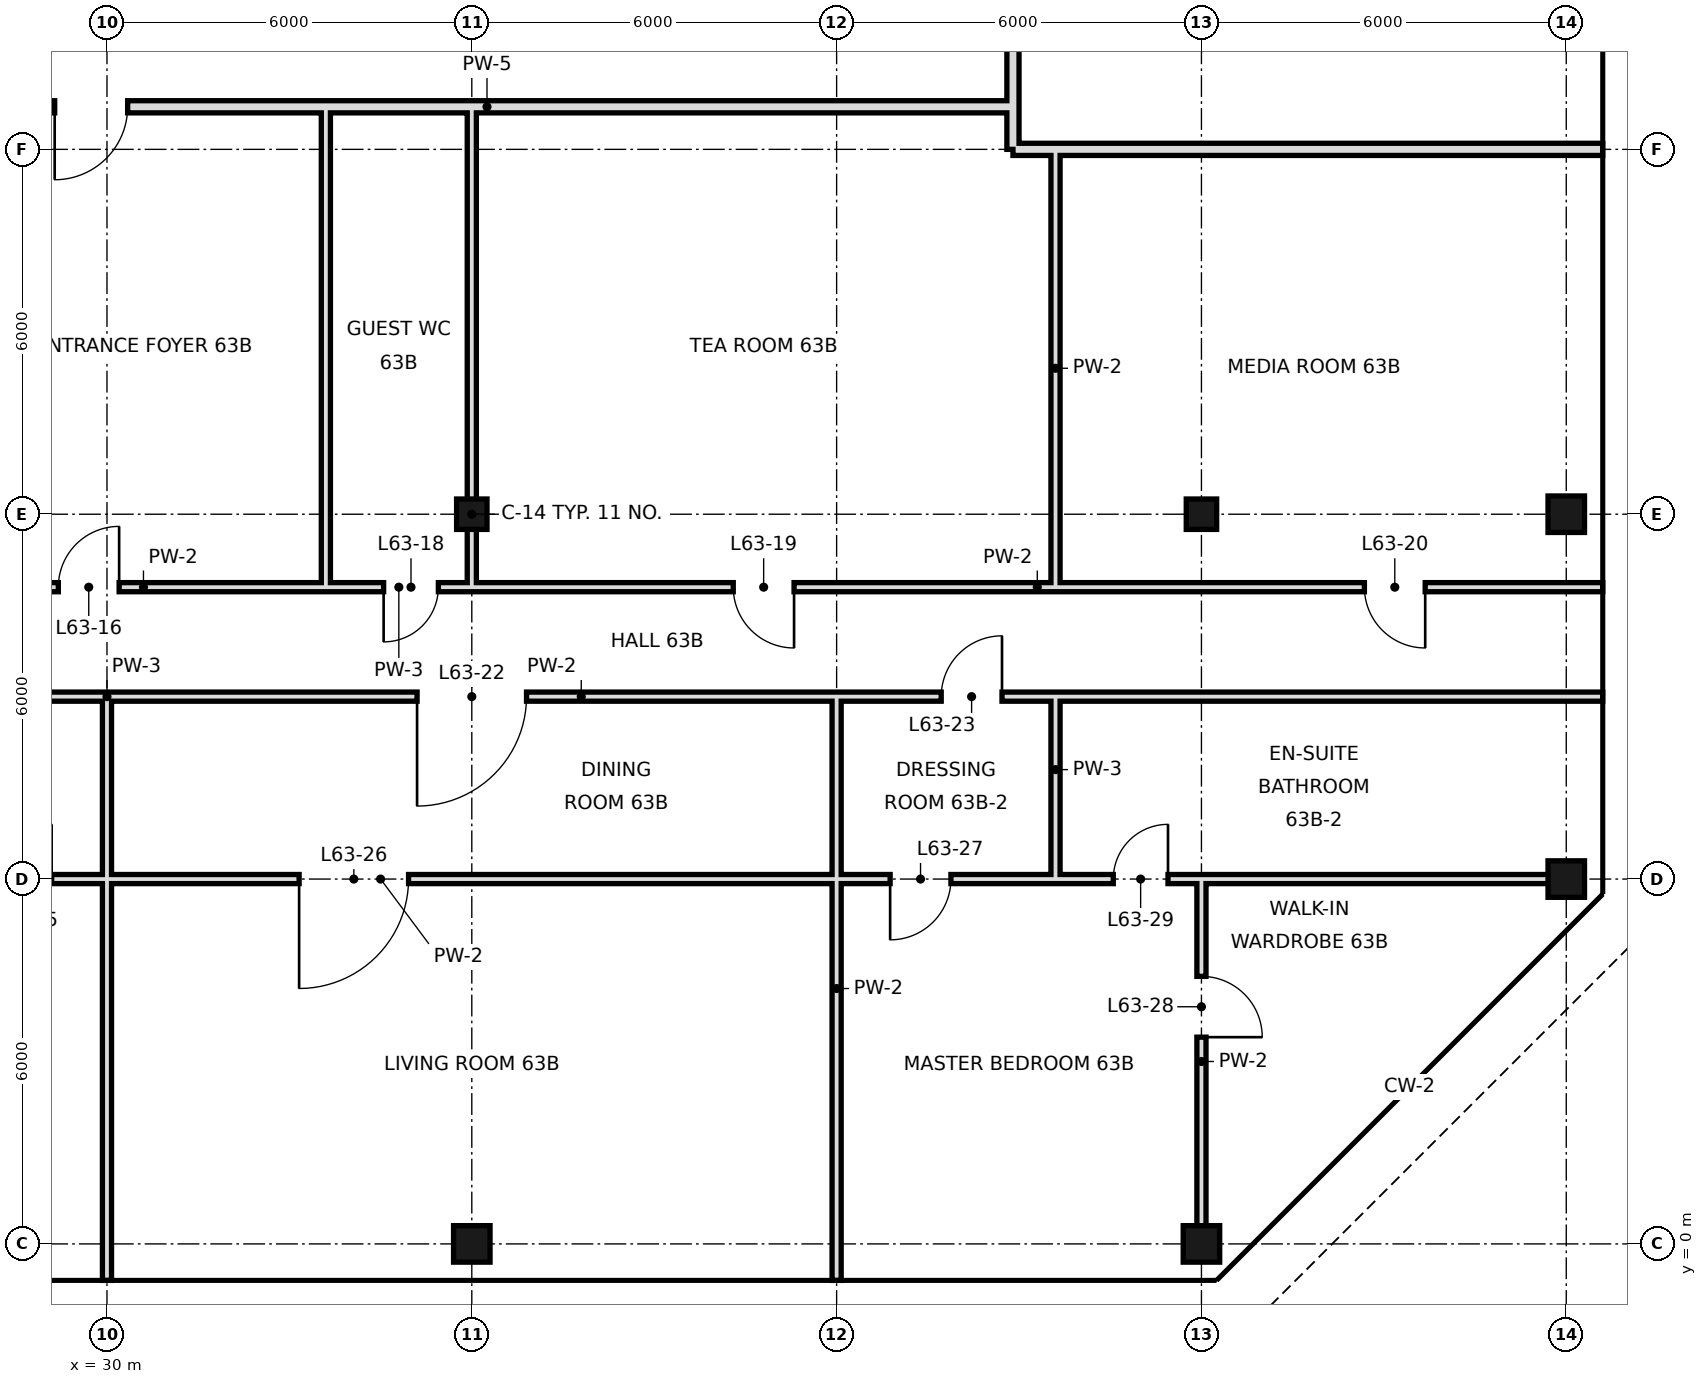
"""IFC4 building model, lengths in metres.
Left out: names, types, materials, properties, quantities, classifications, styles, units other than length and angle.
Written with IfcOpenShell. Run it as: python <this file> out.ifc"""

import sys

from ifc_helpers import new_model, si_unit, direction, frame, frame_2d, origin, origin_2d, place, context, subcontext, project, spatial, rectangle, hollow_rectangle, extrude, element, fill, save


model = new_model("IFC4")
c1 = context("Model", 3, precision=1e-05, world=origin(), true_north=direction((0.0, 1.0)))
c2 = subcontext(c1, "Body", "Model", "MODEL_VIEW")
j1 = project(units=[si_unit("LENGTHUNIT", "METRE"), si_unit("PLANEANGLEUNIT", "RADIAN")], contexts=[c1])
p1 = place(None, origin())
s1 = spatial("IfcSite", under=j1, at=p1, CompositionType="ELEMENT")
p2 = place(p1, origin())
s2 = spatial("IfcBuilding", under=s1, at=p2, CompositionType="ELEMENT")
p3 = place(p2, frame((0.0, 0.0, 266.6)))
s3 = spatial("IfcBuildingStorey", under=s2, at=p3, CompositionType="ELEMENT", Elevation=266.6)
p4 = place(p3, frame((36.0, 0.0, 0.0), z_axis=(0.0, 0.0, 1.0), x_axis=(1.0, 0.0, 0.0)))
e1 = element("IfcColumn", 1, at=p4, inside=s3, PredefinedType="COLUMN", context=c2, shape_type="SweptSolid", body=[
    extrude(hollow_rectangle(XDim=0.6, YDim=0.6, WallThickness=0.028, at=origin_2d()), origin(), (0.0, 0.0, 1.0), 3.6),
])
p5 = place(p3, frame((36.0, 12.0, 0.0), z_axis=(0.0, 0.0, 1.0), x_axis=(1.0, 0.0, 0.0)))
e2 = element("IfcColumn", 2, at=p5, inside=s3, PredefinedType="COLUMN", context=c2, shape_type="SweptSolid", body=[
    extrude(hollow_rectangle(XDim=0.5, YDim=0.5, WallThickness=0.025, at=origin_2d()), origin(), (0.0, 0.0, 1.0), 3.6),
])
p6 = place(p3, frame((48.0, 0.0, 0.0), z_axis=(0.0, 0.0, 1.0), x_axis=(1.0, 0.0, 0.0)))
e3 = element("IfcColumn", 3, at=p6, inside=s3, PredefinedType="COLUMN", context=c2, shape_type="SweptSolid", body=[
    extrude(hollow_rectangle(XDim=0.6, YDim=0.6, WallThickness=0.028, at=origin_2d()), origin(), (0.0, 0.0, 1.0), 3.6),
])
p7 = place(p3, frame((48.0, 12.0, 0.0), z_axis=(0.0, 0.0, 1.0), x_axis=(1.0, 0.0, 0.0)))
e4 = element("IfcColumn", 4, at=p7, inside=s3, PredefinedType="COLUMN", context=c2, shape_type="SweptSolid", body=[
    extrude(hollow_rectangle(XDim=0.5, YDim=0.5, WallThickness=0.025, at=origin_2d()), origin(), (0.0, 0.0, 1.0), 3.6),
])
for number, where, z_axis, x_axis in (
    (5, (54.0, 6.0, 0.0), (0.0, 0.0, 1.0), (1.0, 0.0, 0.0)),
    (6, (54.0, 12.0, 0.0), (0.0, 0.0, 1.0), (1.0, 0.0, 0.0)),
):
    element("IfcColumn", number, at=place(p3, frame(where, z_axis=z_axis, x_axis=x_axis)), inside=s3, PredefinedType="COLUMN", context=c2, shape_type="SweptSolid", body=[
        extrude(hollow_rectangle(XDim=0.6, YDim=0.6, WallThickness=0.028, at=origin_2d()), origin(), (0.0, 0.0, 1.0), 3.6),
    ])
p8 = place(p3, frame((30.0, -0.6, 0.0), z_axis=(0.0, 0.0, 1.0), x_axis=(0.0, 1.0, 0.0)))
e7 = element("IfcWall", 7, at=p8, inside=s3, PredefinedType="PARTITIONING", context=c2, shape_type="SweptSolid", body=[
    extrude(rectangle(XDim=6.6, YDim=0.15, at=frame_2d((3.3, 0.0))), origin(), (0.0, 0.0, 1.0), 2.72),
])
p9 = place(p3, frame((30.0, 6.0, 0.0), z_axis=(0.0, 0.0, 1.0), x_axis=(0.0, 1.0, 0.0)))
e8 = element("IfcWall", 8, at=p9, inside=s3, PredefinedType="PARTITIONING", context=c2, shape_type="SweptSolid", body=[
    extrude(rectangle(XDim=3.0, YDim=0.15, at=frame_2d((1.5, 0.0))), origin(), (0.0, 0.0, 1.0), 2.72),
])
p10 = place(p3, frame((33.6, 10.8, 0.0), z_axis=(0.0, 0.0, 1.0), x_axis=(0.0, 1.0, 0.0)))
e9 = element("IfcWall", 9, at=p10, inside=s3, PredefinedType="PARTITIONING", context=c2, shape_type="SweptSolid", body=[
    extrude(rectangle(XDim=7.9, YDim=0.15, at=frame_2d((3.95, 0.0))), origin(), (0.0, 0.0, 1.0), 3.42),
])
p11 = place(p3, frame((36.0, 10.8, 0.0), z_axis=(0.0, 0.0, 1.0), x_axis=(0.0, 1.0, 0.0)))
e10 = element("IfcWall", 10, at=p11, inside=s3, PredefinedType="PARTITIONING", context=c2, shape_type="SweptSolid", body=[
    extrude(rectangle(XDim=7.9, YDim=0.15, at=frame_2d((3.95, 0.0))), origin(), (0.0, 0.0, 1.0), 2.72),
])
p12 = place(p3, frame((42.0, -0.6, 0.0), z_axis=(0.0, 0.0, 1.0), x_axis=(0.0, 1.0, 0.0)))
e11 = element("IfcWall", 11, at=p12, inside=s3, PredefinedType="PARTITIONING", context=c2, shape_type="SweptSolid", body=[
    extrude(rectangle(XDim=9.6, YDim=0.15, at=frame_2d((4.8, 0.0))), origin(), (0.0, 0.0, 1.0), 2.72),
])
p13 = place(p3, frame((44.9, 18.0, 0.0), z_axis=(0.0, 0.0, 1.0), x_axis=(0.0, 1.0, 0.0)))
e12 = element("IfcWall", 12, at=p13, inside=s3, PredefinedType="SOLIDWALL", context=c2, shape_type="SweptSolid", body=[
    extrude(rectangle(XDim=30.6, YDim=0.2, at=frame_2d((15.3, 0.0))), origin(), (0.0, 0.0, 1.0), 2.72),
])
p14 = place(p13, frame((20.27, 0.0, 0.0)))
e13 = element("IfcOpeningElement", 13, at=p14, cuts=e12, PredefinedType="OPENING", context=c2, shape_type="SweptSolid", body=[
    extrude(rectangle(XDim=1.2, YDim=2.4, at=frame_2d((0.6, 1.2))), frame((0.0, 0.11, 0.0), z_axis=(0.0, -1.0, 0.0), x_axis=(1.0, 0.0, 0.0)), (0.0, 0.0, 1.0), 0.22),
])
p15 = place(p3, frame((45.6, 10.8, 0.0), z_axis=(0.0, 0.0, 1.0), x_axis=(0.0, 1.0, 0.0)))
e14 = element("IfcWall", 14, at=p15, inside=s3, PredefinedType="PARTITIONING", context=c2, shape_type="SweptSolid", body=[
    extrude(rectangle(XDim=7.2, YDim=0.15, at=frame_2d((3.6, 0.0))), origin(), (0.0, 0.0, 1.0), 3.42),
])
p16 = place(p3, frame((45.6, 6.0, 0.0), z_axis=(0.0, 0.0, 1.0), x_axis=(0.0, 1.0, 0.0)))
e15 = element("IfcWall", 15, at=p16, inside=s3, PredefinedType="PARTITIONING", context=c2, shape_type="SweptSolid", body=[
    extrude(rectangle(XDim=3.0, YDim=0.15, at=frame_2d((1.5, 0.0))), origin(), (0.0, 0.0, 1.0), 3.42),
])
p17 = place(p3, frame((48.0, 0.0, 0.0), z_axis=(0.0, 0.0, 1.0), x_axis=(0.0, 1.0, 0.0)))
e16 = element("IfcWall", 16, at=p17, inside=s3, PredefinedType="PARTITIONING", context=c2, shape_type="SweptSolid", body=[
    extrude(rectangle(XDim=6.0, YDim=0.15, at=frame_2d((3.0, 0.0))), origin(), (0.0, 0.0, 1.0), 2.72),
])
p18 = place(p17, frame((3.4, 0.0, 0.0)))
e17 = element("IfcOpeningElement", 17, at=p18, cuts=e16, PredefinedType="OPENING", context=c2, shape_type="SweptSolid", body=[
    extrude(rectangle(XDim=1.0, YDim=2.4, at=frame_2d((0.5, 1.2))), frame((0.0, 0.085, 0.0), z_axis=(0.0, -1.0, 0.0), x_axis=(1.0, 0.0, 0.0)), (0.0, 0.0, 1.0), 0.17),
])
p19 = place(p3, frame((27.6, 10.8, 0.0), z_axis=(0.0, 0.0, 1.0), x_axis=(1.0, 0.0, 0.0)))
e18 = element("IfcWall", 18, at=p19, inside=s3, PredefinedType="PARTITIONING", context=c2, shape_type="SweptSolid", body=[
    extrude(rectangle(XDim=6.0, YDim=0.15, at=frame_2d((3.0, 0.0))), origin(), (0.0, 0.0, 1.0), 3.42),
])
p20 = place(p19, frame((1.6, 0.0, 0.0)))
e19 = element("IfcOpeningElement", 19, at=p20, cuts=e18, PredefinedType="OPENING", context=c2, shape_type="SweptSolid", body=[
    extrude(rectangle(XDim=1.0, YDim=2.4, at=frame_2d((0.5, 1.2))), frame((0.0, 0.085, 0.0), z_axis=(0.0, -1.0, 0.0), x_axis=(1.0, 0.0, 0.0)), (0.0, 0.0, 1.0), 0.17),
])
p21 = place(p3, frame((36.0, 10.8, 0.0), z_axis=(0.0, 0.0, 1.0), x_axis=(1.0, 0.0, 0.0)))
e20 = element("IfcWall", 20, at=p21, inside=s3, PredefinedType="PARTITIONING", context=c2, shape_type="SweptSolid", body=[
    extrude(rectangle(XDim=18.6, YDim=0.15, at=frame_2d((9.3, 0.0))), origin(), (0.0, 0.0, 1.0), 3.42),
])
p22 = place(p21, frame((4.3, 0.0, 0.0)))
e21 = element("IfcOpeningElement", 21, at=p22, cuts=e20, PredefinedType="OPENING", context=c2, shape_type="SweptSolid", body=[
    extrude(rectangle(XDim=1.0, YDim=2.4, at=frame_2d((0.5, 1.2))), frame((0.0, 0.085, 0.0), z_axis=(0.0, -1.0, 0.0), x_axis=(1.0, 0.0, 0.0)), (0.0, 0.0, 1.0), 0.17),
])
p23 = place(p21, frame((14.68, 0.0, 0.0)))
e22 = element("IfcOpeningElement", 22, at=p23, cuts=e20, PredefinedType="OPENING", context=c2, shape_type="SweptSolid", body=[
    extrude(rectangle(XDim=1.0, YDim=2.4, at=frame_2d((0.5, 1.2))), frame((0.0, 0.085, 0.0), z_axis=(0.0, -1.0, 0.0), x_axis=(1.0, 0.0, 0.0)), (0.0, 0.0, 1.0), 0.17),
])
p24 = place(p3, frame((33.6, 10.8, 0.0), z_axis=(0.0, 0.0, 1.0), x_axis=(1.0, 0.0, 0.0)))
e23 = element("IfcWall", 23, at=p24, inside=s3, PredefinedType="PARTITIONING", context=c2, shape_type="SweptSolid", body=[
    extrude(rectangle(XDim=2.4, YDim=0.15, at=frame_2d((1.2, 0.0))), origin(), (0.0, 0.0, 1.0), 3.42),
])
p25 = place(p24, frame((0.95, 0.0, 0.0)))
e24 = element("IfcOpeningElement", 24, at=p25, cuts=e23, PredefinedType="OPENING", context=c2, shape_type="SweptSolid", body=[
    extrude(rectangle(XDim=0.9, YDim=2.4, at=frame_2d((0.45, 1.2))), frame((0.0, 0.085, 0.0), z_axis=(0.0, -1.0, 0.0), x_axis=(1.0, 0.0, 0.0)), (0.0, 0.0, 1.0), 0.17),
])
p26 = place(p3, frame((44.9, 18.0, 0.0), z_axis=(0.0, 0.0, 1.0), x_axis=(1.0, 0.0, 0.0)))
e25 = element("IfcWall", 25, at=p26, inside=s3, PredefinedType="SOLIDWALL", context=c2, shape_type="SweptSolid", body=[
    extrude(rectangle(XDim=9.7, YDim=0.2, at=frame_2d((4.85, 0.0))), origin(), (0.0, 0.0, 1.0), 2.72),
])
p27 = place(p3, frame((27.6, 18.7, 0.0), z_axis=(0.0, 0.0, 1.0), x_axis=(1.0, 0.0, 0.0)))
e26 = element("IfcWall", 26, at=p27, inside=s3, PredefinedType="SOLIDWALL", context=c2, shape_type="SweptSolid", body=[
    extrude(rectangle(XDim=17.3, YDim=0.2, at=frame_2d((8.65, 0.0))), origin(), (0.0, 0.0, 1.0), 2.72),
])
p28 = place(p27, frame((1.54, 0.0, 0.0)))
e27 = element("IfcOpeningElement", 27, at=p28, cuts=e26, PredefinedType="OPENING", context=c2, shape_type="SweptSolid", body=[
    extrude(rectangle(XDim=1.2, YDim=2.4, at=frame_2d((0.6, 1.2))), frame((0.0, 0.11, 0.0), z_axis=(0.0, -1.0, 0.0), x_axis=(1.0, 0.0, 0.0)), (0.0, 0.0, 1.0), 0.22),
])
p29 = place(p3, frame((30.0, 6.0, 0.0), z_axis=(0.0, 0.0, 1.0), x_axis=(1.0, 0.0, 0.0)))
e28 = element("IfcWall", 28, at=p29, inside=s3, PredefinedType="PARTITIONING", context=c2, shape_type="SweptSolid", body=[
    extrude(rectangle(XDim=15.6, YDim=0.15, at=frame_2d((7.8, 0.0))), origin(), (0.0, 0.0, 1.0), 2.97),
])
p30 = place(p29, frame((3.16, 0.0, 0.0)))
e29 = element("IfcOpeningElement", 29, at=p30, cuts=e28, PredefinedType="OPENING", context=c2, shape_type="SweptSolid", body=[
    extrude(rectangle(XDim=1.8, YDim=2.4, at=frame_2d((0.9, 1.2))), frame((0.0, 0.085, 0.0), z_axis=(0.0, -1.0, 0.0), x_axis=(1.0, 0.0, 0.0)), (0.0, 0.0, 1.0), 0.17),
])
p31 = place(p29, frame((12.88, 0.0, 0.0)))
e30 = element("IfcOpeningElement", 30, at=p31, cuts=e28, PredefinedType="OPENING", context=c2, shape_type="SweptSolid", body=[
    extrude(rectangle(XDim=1.0, YDim=2.4, at=frame_2d((0.5, 1.2))), frame((0.0, 0.085, 0.0), z_axis=(0.0, -1.0, 0.0), x_axis=(1.0, 0.0, 0.0)), (0.0, 0.0, 1.0), 0.17),
])
p32 = place(p3, frame((26.4, 6.0, 0.0), z_axis=(0.0, 0.0, 1.0), x_axis=(1.0, 0.0, 0.0)))
e31 = element("IfcWall", 31, at=p32, inside=s3, PredefinedType="PARTITIONING", context=c2, shape_type="SweptSolid", body=[
    extrude(rectangle(XDim=3.6, YDim=0.15, at=frame_2d((1.8, 0.0))), origin(), (0.0, 0.0, 1.0), 2.97),
])
p33 = place(p32, frame((1.79, 0.0, 0.0)))
e32 = element("IfcOpeningElement", 32, at=p33, cuts=e31, PredefinedType="OPENING", context=c2, shape_type="SweptSolid", body=[
    extrude(rectangle(XDim=0.9, YDim=2.4, at=frame_2d((0.45, 1.2))), frame((0.0, 0.085, 0.0), z_axis=(0.0, -1.0, 0.0), x_axis=(1.0, 0.0, 0.0)), (0.0, 0.0, 1.0), 0.17),
])
p34 = place(p3, frame((45.6, 6.0, 0.0), z_axis=(0.0, 0.0, 1.0), x_axis=(1.0, 0.0, 0.0)))
e33 = element("IfcWall", 33, at=p34, inside=s3, PredefinedType="PARTITIONING", context=c2, shape_type="SweptSolid", body=[
    extrude(rectangle(XDim=8.4, YDim=0.15, at=frame_2d((4.2, 0.0))), origin(), (0.0, 0.0, 1.0), 2.97),
])
p35 = place(p34, frame((0.95, 0.0, 0.0)))
e34 = element("IfcOpeningElement", 34, at=p35, cuts=e33, PredefinedType="OPENING", context=c2, shape_type="SweptSolid", body=[
    extrude(rectangle(XDim=0.9, YDim=2.4, at=frame_2d((0.45, 1.2))), frame((0.0, 0.085, 0.0), z_axis=(0.0, -1.0, 0.0), x_axis=(1.0, 0.0, 0.0)), (0.0, 0.0, 1.0), 0.17),
])
p36 = place(p3, frame((30.0, 9.0, 0.0), z_axis=(0.0, 0.0, 1.0), x_axis=(1.0, 0.0, 0.0)))
e35 = element("IfcWall", 35, at=p36, inside=s3, PredefinedType="PARTITIONING", context=c2, shape_type="SweptSolid", body=[
    extrude(rectangle(XDim=15.6, YDim=0.15, at=frame_2d((7.8, 0.0))), origin(), (0.0, 0.0, 1.0), 3.42),
])
p37 = place(p36, frame((5.1, 0.0, 0.0)))
e36 = element("IfcOpeningElement", 36, at=p37, cuts=e35, PredefinedType="OPENING", context=c2, shape_type="SweptSolid", body=[
    extrude(rectangle(XDim=1.8, YDim=2.4, at=frame_2d((0.9, 1.2))), frame((0.0, 0.085, 0.0), z_axis=(0.0, -1.0, 0.0), x_axis=(1.0, 0.0, 0.0)), (0.0, 0.0, 1.0), 0.17),
])
p38 = place(p36, frame((13.72, 0.0, 0.0)))
e37 = element("IfcOpeningElement", 37, at=p38, cuts=e35, PredefinedType="OPENING", context=c2, shape_type="SweptSolid", body=[
    extrude(rectangle(XDim=1.0, YDim=2.4, at=frame_2d((0.5, 1.2))), frame((0.0, 0.085, 0.0), z_axis=(0.0, -1.0, 0.0), x_axis=(1.0, 0.0, 0.0)), (0.0, 0.0, 1.0), 0.17),
])
p39 = place(p3, frame((26.4, 9.0, 0.0), z_axis=(0.0, 0.0, 1.0), x_axis=(1.0, 0.0, 0.0)))
e38 = element("IfcWall", 38, at=p39, inside=s3, PredefinedType="PARTITIONING", context=c2, shape_type="SweptSolid", body=[
    extrude(rectangle(XDim=3.6, YDim=0.15, at=frame_2d((1.8, 0.0))), origin(), (0.0, 0.0, 1.0), 3.42),
])
p40 = place(p3, frame((45.6, 9.0, 0.0), z_axis=(0.0, 0.0, 1.0), x_axis=(1.0, 0.0, 0.0)))
e39 = element("IfcWall", 39, at=p40, inside=s3, PredefinedType="PARTITIONING", context=c2, shape_type="SweptSolid", body=[
    extrude(rectangle(XDim=9.0, YDim=0.15, at=frame_2d((4.5, 0.0))), origin(), (0.0, 0.0, 1.0), 3.42),
])
p41 = place(p20, frame((1.0, 0.0, 0.0), z_axis=(0.0, 0.0, 1.0), x_axis=(-1.0, 0.0, 0.0)))
e40 = element("IfcDoor", 40, at=p41, inside=s3, OperationType="SINGLE_SWING_LEFT", PredefinedType="DOOR", context=c2, shape_type="SweptSolid", body=[
    extrude(rectangle(XDim=1.0, YDim=2.4, at=frame_2d((0.5, 1.2))), frame((0.0, 0.025, 0.0), z_axis=(0.0, -1.0, 0.0), x_axis=(1.0, 0.0, 0.0)), (0.0, 0.0, 1.0), 0.05),
])
fill(e19, e40)
p42 = place(p25, frame((0.9, 0.0, 0.0), z_axis=(0.0, 0.0, 1.0), x_axis=(-1.0, 0.0, 0.0)))
e41 = element("IfcDoor", 41, at=p42, inside=s3, OperationType="SINGLE_SWING_RIGHT", PredefinedType="DOOR", context=c2, shape_type="SweptSolid", body=[
    extrude(rectangle(XDim=0.9, YDim=2.4, at=frame_2d((0.45, 1.2))), frame((0.0, 0.025, 0.0), z_axis=(0.0, -1.0, 0.0), x_axis=(1.0, 0.0, 0.0)), (0.0, 0.0, 1.0), 0.05),
])
fill(e24, e41)
p43 = place(p22, origin())
e42 = element("IfcDoor", 42, at=p43, inside=s3, OperationType="SINGLE_SWING_RIGHT", PredefinedType="DOOR", context=c2, shape_type="SweptSolid", body=[
    extrude(rectangle(XDim=1.0, YDim=2.4, at=frame_2d((0.5, 1.2))), frame((0.0, 0.025, 0.0), z_axis=(0.0, -1.0, 0.0), x_axis=(1.0, 0.0, 0.0)), (0.0, 0.0, 1.0), 0.05),
])
fill(e21, e42)
p44 = place(p23, origin())
e43 = element("IfcDoor", 43, at=p44, inside=s3, OperationType="SINGLE_SWING_RIGHT", PredefinedType="DOOR", context=c2, shape_type="SweptSolid", body=[
    extrude(rectangle(XDim=1.0, YDim=2.4, at=frame_2d((0.5, 1.2))), frame((0.0, 0.025, 0.0), z_axis=(0.0, -1.0, 0.0), x_axis=(1.0, 0.0, 0.0)), (0.0, 0.0, 1.0), 0.05),
])
fill(e22, e43)
p45 = place(p37, frame((1.8, 0.0, 0.0), z_axis=(0.0, 0.0, 1.0), x_axis=(-1.0, 0.0, 0.0)))
e44 = element("IfcDoor", 44, at=p45, inside=s3, OperationType="SINGLE_SWING_RIGHT", PredefinedType="DOOR", context=c2, shape_type="SweptSolid", body=[
    extrude(rectangle(XDim=1.8, YDim=2.4, at=frame_2d((0.9, 1.2))), frame((0.0, 0.025, 0.0), z_axis=(0.0, -1.0, 0.0), x_axis=(1.0, 0.0, 0.0)), (0.0, 0.0, 1.0), 0.05),
])
fill(e36, e44)
p46 = place(p38, frame((1.0, 0.0, 0.0), z_axis=(0.0, 0.0, 1.0), x_axis=(-1.0, 0.0, 0.0)))
e45 = element("IfcDoor", 45, at=p46, inside=s3, OperationType="SINGLE_SWING_LEFT", PredefinedType="DOOR", context=c2, shape_type="SweptSolid", body=[
    extrude(rectangle(XDim=1.0, YDim=2.4, at=frame_2d((0.5, 1.2))), frame((0.0, 0.025, 0.0), z_axis=(0.0, -1.0, 0.0), x_axis=(1.0, 0.0, 0.0)), (0.0, 0.0, 1.0), 0.05),
])
fill(e37, e45)
p47 = place(p30, frame((1.8, 0.0, 0.0), z_axis=(0.0, 0.0, 1.0), x_axis=(-1.0, 0.0, 0.0)))
e46 = element("IfcDoor", 46, at=p47, inside=s3, OperationType="SINGLE_SWING_RIGHT", PredefinedType="DOOR", context=c2, shape_type="SweptSolid", body=[
    extrude(rectangle(XDim=1.8, YDim=2.4, at=frame_2d((0.9, 1.2))), frame((0.0, 0.025, 0.0), z_axis=(0.0, -1.0, 0.0), x_axis=(1.0, 0.0, 0.0)), (0.0, 0.0, 1.0), 0.05),
])
fill(e29, e46)
p48 = place(p31, frame((1.0, 0.0, 0.0), z_axis=(0.0, 0.0, 1.0), x_axis=(-1.0, 0.0, 0.0)))
e47 = element("IfcDoor", 47, at=p48, inside=s3, OperationType="SINGLE_SWING_RIGHT", PredefinedType="DOOR", context=c2, shape_type="SweptSolid", body=[
    extrude(rectangle(XDim=1.0, YDim=2.4, at=frame_2d((0.5, 1.2))), frame((0.0, 0.025, 0.0), z_axis=(0.0, -1.0, 0.0), x_axis=(1.0, 0.0, 0.0)), (0.0, 0.0, 1.0), 0.05),
])
fill(e30, e47)
p49 = place(p18, frame((1.0, 0.0, 0.0), z_axis=(0.0, 0.0, 1.0), x_axis=(-1.0, 0.0, 0.0)))
e48 = element("IfcDoor", 48, at=p49, inside=s3, OperationType="SINGLE_SWING_RIGHT", PredefinedType="DOOR", context=c2, shape_type="SweptSolid", body=[
    extrude(rectangle(XDim=1.0, YDim=2.4, at=frame_2d((0.5, 1.2))), frame((0.0, 0.025, 0.0), z_axis=(0.0, -1.0, 0.0), x_axis=(1.0, 0.0, 0.0)), (0.0, 0.0, 1.0), 0.05),
])
fill(e17, e48)
p50 = place(p35, frame((0.9, 0.0, 0.0), z_axis=(0.0, 0.0, 1.0), x_axis=(-1.0, 0.0, 0.0)))
e49 = element("IfcDoor", 49, at=p50, inside=s3, OperationType="SINGLE_SWING_LEFT", PredefinedType="DOOR", context=c2, shape_type="SweptSolid", body=[
    extrude(rectangle(XDim=0.9, YDim=2.4, at=frame_2d((0.45, 1.2))), frame((0.0, 0.025, 0.0), z_axis=(0.0, -1.0, 0.0), x_axis=(1.0, 0.0, 0.0)), (0.0, 0.0, 1.0), 0.05),
])
fill(e34, e49)
p51 = place(p28, frame((1.2, 0.0, 0.0), z_axis=(0.0, 0.0, 1.0), x_axis=(-1.0, 0.0, 0.0)))
e50 = element("IfcDoor", 50, at=p51, inside=s3, OperationType="SINGLE_SWING_RIGHT", PredefinedType="DOOR", context=c2, shape_type="SweptSolid", body=[
    extrude(rectangle(XDim=1.2, YDim=2.4, at=frame_2d((0.6, 1.2))), frame((0.0, 0.025, 0.0), z_axis=(0.0, -1.0, 0.0), x_axis=(1.0, 0.0, 0.0)), (0.0, 0.0, 1.0), 0.05),
])
fill(e27, e50)
save(model, sys.argv[1])
